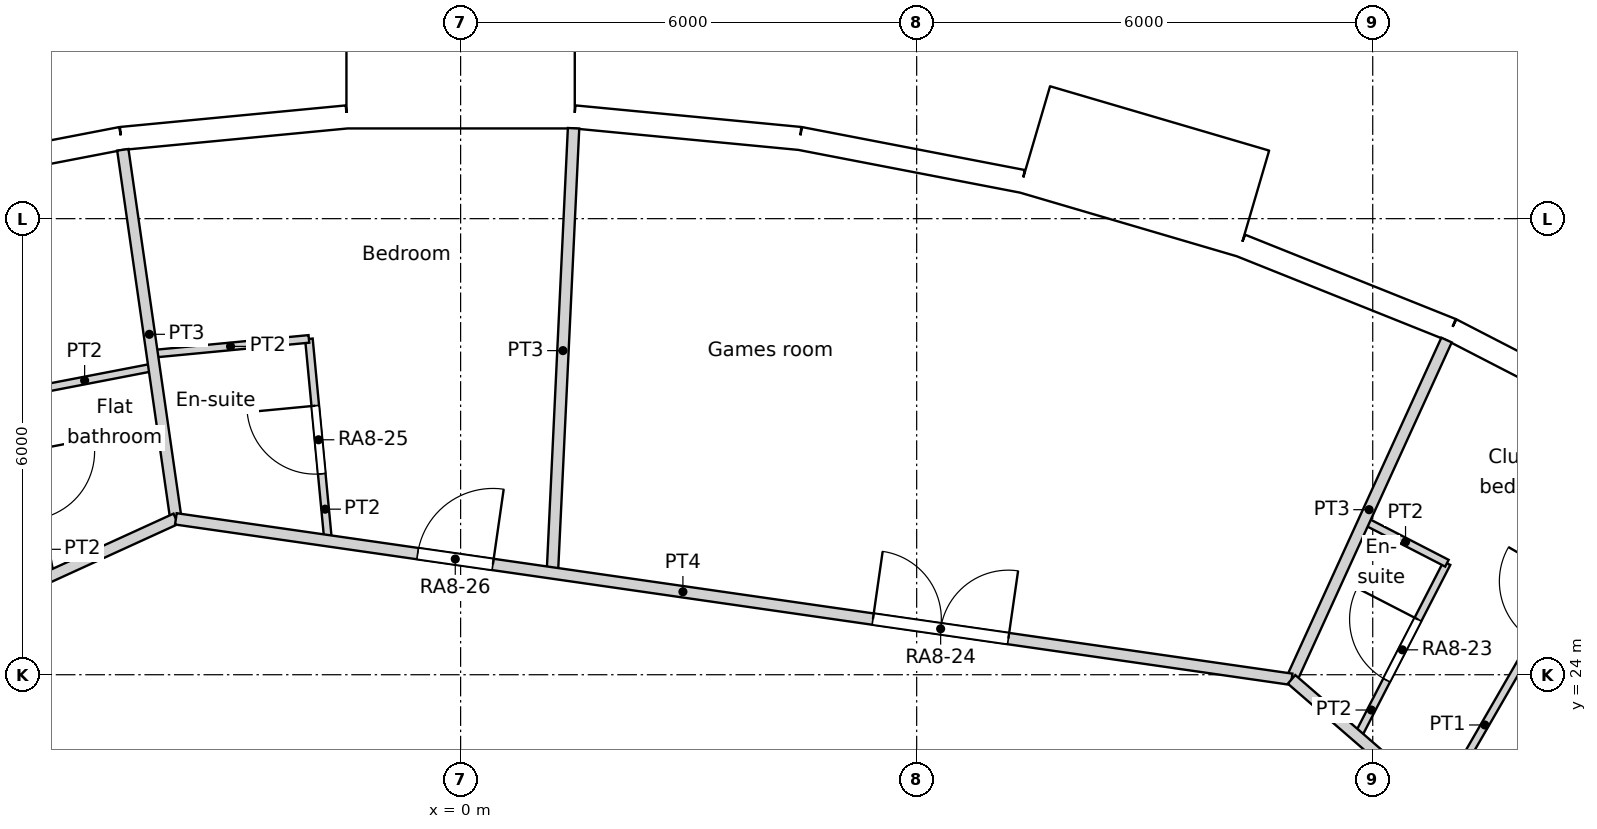
"""IFC4 building model, lengths in metres.
Left out: names, types, materials, properties, quantities, classifications, styles, units other than length and angle.
Written with IfcOpenShell. Run it as: python <this file> out.ifc"""

import sys

from ifc_helpers import new_model, si_unit, direction, frame, frame_2d, origin, origin_2d, place, context, subcontext, project, spatial, rectangle, circle, extrude, element, fill, save


model = new_model("IFC4")
c1 = context("Model", 3, precision=1e-05, world=origin(), true_north=direction((0.0, 1.0)))
c2 = subcontext(c1, "Body", "Model", "MODEL_VIEW")
j1 = project(units=[si_unit("LENGTHUNIT", "METRE"), si_unit("PLANEANGLEUNIT", "RADIAN")], contexts=[c1])
p1 = place(None, origin())
s1 = spatial("IfcSite", under=j1, at=p1, CompositionType="ELEMENT")
p2 = place(p1, origin())
s2 = spatial("IfcBuilding", under=s1, at=p2, CompositionType="ELEMENT")
p3 = place(p2, frame((0.0, 0.0, 103.8)))
s3 = spatial("IfcBuildingStorey", under=s2, at=p3, CompositionType="ELEMENT", Elevation=103.8)
for number, where, z_axis, x_axis in (
    (1, (12.576, 27.539, 0.0), (0.0, 0.0, 1.0), (1.0, 0.0, 0.0)),
    (2, (7.137, 29.421, 0.0), (0.0, 0.0, 1.0), (1.0, 0.0, 0.0)),
    (3, (1.44, 30.24, 0.0), (0.0, 0.0, 1.0), (1.0, 0.0, 0.0)),
    (4, (-4.309, 29.966, 0.0), (0.0, 0.0, 1.0), (1.0, 0.0, 0.0)),
):
    element("IfcColumn", number, at=place(p3, frame(where, z_axis=z_axis, x_axis=x_axis)), inside=s3, PredefinedType="COLUMN", context=c2, shape_type="SweptSolid", body=[
        extrude(circle(Radius=0.6, at=origin_2d()), origin(), (0.0, 0.0, 1.0), 3.6),
    ])
for number, where, z_axis, x_axis in (
    (5, (9.723, 22.54, 0.0), (0.0, 0.0, 1.0), (1.0, 0.0, 0.0)),
    (6, (4.263, 24.175, 0.0), (0.0, 0.0, 1.0), (1.0, 0.0, 0.0)),
    (7, (-1.427, 24.506, 0.0), (0.0, 0.0, 1.0), (1.0, 0.0, 0.0)),
):
    element("IfcColumn", number, at=place(p3, frame(where, z_axis=z_axis, x_axis=x_axis)), inside=s3, PredefinedType="COLUMN", context=c2, shape_type="SweptSolid", body=[
        extrude(circle(Radius=0.65, at=origin_2d()), origin(), (0.0, 0.0, 1.0), 3.6),
    ])
p4 = place(p3, frame((15.682, 27.174, 0.0), z_axis=(0.0, 0.0, 1.0), x_axis=(-0.888819853856, 0.458256770153, 0.0)))
e8 = element("IfcWall", 8, at=p4, inside=s3, PredefinedType="SOLIDWALL", context=c2, shape_type="SweptSolid", body=[
    extrude(rectangle(XDim=2.98, YDim=0.3, at=frame_2d((1.49, 0.0))), origin(), (0.0, 0.0, 1.0), 3.15),
])
p5 = place(p4, frame((1.49, 0.0, 1.55)))
e9 = element("IfcOpeningElement", 9, at=p5, cuts=e8, PredefinedType="OPENING", context=c2, shape_type="SweptSolid", body=[
    extrude(circle(Radius=0.9, at=origin_2d()), frame((0.0, 0.16, 0.0), z_axis=(0.0, -1.0, 0.0), x_axis=(1.0, 0.0, 0.0)), (0.0, 0.0, 1.0), 0.32),
])
p6 = place(p3, frame((13.033, 28.539, 0.0), z_axis=(0.0, 0.0, 1.0), x_axis=(-0.928403213937, 0.371574316054, 0.0)))
e10 = element("IfcWall", 10, at=p6, inside=s3, PredefinedType="SOLIDWALL", context=c2, shape_type="SweptSolid", body=[
    extrude(rectangle(XDim=2.98, YDim=0.3, at=frame_2d((1.49, 0.0))), origin(), (0.0, 0.0, 1.0), 3.15),
])
p7 = place(p6, frame((1.49, 0.0, 1.55)))
e11 = element("IfcOpeningElement", 11, at=p7, cuts=e10, PredefinedType="OPENING", context=c2, shape_type="SweptSolid", body=[
    extrude(circle(Radius=0.9, at=origin_2d()), frame((0.0, 0.16, 0.0), z_axis=(0.0, -1.0, 0.0), x_axis=(1.0, 0.0, 0.0)), (0.0, 0.0, 1.0), 0.32),
])
p8 = place(p3, frame((10.43, 30.198, -0.45), z_axis=(0.0, 0.0, 1.0), x_axis=(-0.959489813418, 0.281743319258, 0.0)))
e12 = element("IfcWall", 12, at=p8, inside=s3, PredefinedType="ELEMENTEDWALL", context=c2, shape_type="SweptSolid", body=[
    extrude(rectangle(XDim=3.0, YDim=1.45, at=frame_2d((1.5, 0.0))), origin(), (0.0, 0.0, 1.0), 3.6),
])
p9 = place(p8, frame((1.5, 0.0, 2.0)))
e13 = element("IfcOpeningElement", 13, at=p9, cuts=e12, PredefinedType="OPENING", context=c2, shape_type="SweptSolid", body=[
    extrude(circle(Radius=0.9, at=origin_2d()), frame((0.0, 0.735, 0.0), z_axis=(0.0, -1.0, 0.0), x_axis=(1.0, 0.0, 0.0)), (0.0, 0.0, 1.0), 1.47),
])
p10 = place(p3, frame((7.391, 30.491, 0.0), z_axis=(0.0, 0.0, 1.0), x_axis=(-0.981924535406, 0.189272836848, 0.0)))
e14 = element("IfcWall", 14, at=p10, inside=s3, PredefinedType="SOLIDWALL", context=c2, shape_type="SweptSolid", body=[
    extrude(rectangle(XDim=2.98, YDim=0.3, at=frame_2d((1.49, 0.0))), origin(), (0.0, 0.0, 1.0), 3.15),
])
p11 = place(p10, frame((1.49, 0.0, 1.55)))
e15 = element("IfcOpeningElement", 15, at=p11, cuts=e14, PredefinedType="OPENING", context=c2, shape_type="SweptSolid", body=[
    extrude(circle(Radius=0.9, at=origin_2d()), frame((0.0, 0.16, 0.0), z_axis=(0.0, -1.0, 0.0), x_axis=(1.0, 0.0, 0.0)), (0.0, 0.0, 1.0), 0.32),
])
p12 = place(p3, frame((4.465, 31.055, 0.0), z_axis=(0.0, 0.0, 1.0), x_axis=(-0.995473351551, 0.095041077185, 0.0)))
e16 = element("IfcWall", 16, at=p12, inside=s3, PredefinedType="SOLIDWALL", context=c2, shape_type="SweptSolid", body=[
    extrude(rectangle(XDim=2.98, YDim=0.3, at=frame_2d((1.49, 0.0))), origin(), (0.0, 0.0, 1.0), 3.15),
])
p13 = place(p12, frame((1.49, 0.0, 1.55)))
e17 = element("IfcOpeningElement", 17, at=p13, cuts=e16, PredefinedType="OPENING", context=c2, shape_type="SweptSolid", body=[
    extrude(circle(Radius=0.9, at=origin_2d()), frame((0.0, 0.16, 0.0), z_axis=(0.0, -1.0, 0.0), x_axis=(1.0, 0.0, 0.0)), (0.0, 0.0, 1.0), 0.32),
])
p14 = place(p3, frame((1.5, 31.914, -0.45), z_axis=(0.0, 0.0, 1.0), x_axis=(-1.0, 0.0, 0.0)))
e18 = element("IfcWall", 18, at=p14, inside=s3, PredefinedType="ELEMENTEDWALL", context=c2, shape_type="SweptSolid", body=[
    extrude(rectangle(XDim=3.0, YDim=1.45, at=frame_2d((1.5, 0.0))), origin(), (0.0, 0.0, 1.0), 3.6),
])
p15 = place(p14, frame((1.5, 0.0, 2.0)))
e19 = element("IfcOpeningElement", 19, at=p15, cuts=e18, PredefinedType="OPENING", context=c2, shape_type="SweptSolid", body=[
    extrude(circle(Radius=0.9, at=origin_2d()), frame((0.0, 0.735, 0.0), z_axis=(0.0, -1.0, 0.0), x_axis=(1.0, 0.0, 0.0)), (0.0, 0.0, 1.0), 1.47),
])
p16 = place(p3, frame((-1.499, 31.338, 0.0), z_axis=(0.0, 0.0, 1.0), x_axis=(-0.995473351551, -0.095041077185, 0.0)))
e20 = element("IfcWall", 20, at=p16, inside=s3, PredefinedType="SOLIDWALL", context=c2, shape_type="SweptSolid", body=[
    extrude(rectangle(XDim=2.98, YDim=0.3, at=frame_2d((1.49, 0.0))), origin(), (0.0, 0.0, 1.0), 3.15),
])
p17 = place(p16, frame((1.49, 0.0, 1.55)))
e21 = element("IfcOpeningElement", 21, at=p17, cuts=e20, PredefinedType="OPENING", context=c2, shape_type="SweptSolid", body=[
    extrude(circle(Radius=0.9, at=origin_2d()), frame((0.0, 0.16, 0.0), z_axis=(0.0, -1.0, 0.0), x_axis=(1.0, 0.0, 0.0)), (0.0, 0.0, 1.0), 0.32),
])
p18 = place(p3, frame((-4.465, 31.055, 0.0), z_axis=(0.0, 0.0, 1.0), x_axis=(-0.981924535406, -0.189272836848, 0.0)))
e22 = element("IfcWall", 22, at=p18, inside=s3, PredefinedType="SOLIDWALL", context=c2, shape_type="SweptSolid", body=[
    extrude(rectangle(XDim=2.98, YDim=0.3, at=frame_2d((1.49, 0.0))), origin(), (0.0, 0.0, 1.0), 3.15),
])
p19 = place(p18, frame((1.49, 0.0, 1.55)))
e23 = element("IfcOpeningElement", 23, at=p19, cuts=e22, PredefinedType="OPENING", context=c2, shape_type="SweptSolid", body=[
    extrude(circle(Radius=0.9, at=origin_2d()), frame((0.0, 0.16, 0.0), z_axis=(0.0, -1.0, 0.0), x_axis=(1.0, 0.0, 0.0)), (0.0, 0.0, 1.0), 0.32),
])
p20 = place(p3, frame((10.932, 23.939, 0.0), z_axis=(0.0, 0.0, 1.0), x_axis=(0.755838982892, -0.654757536757, 0.0)))
e24 = element("IfcWall", 24, at=p20, inside=s3, PredefinedType="PARTITIONING", context=c2, shape_type="SweptSolid", body=[
    extrude(rectangle(XDim=14.83, YDim=0.15, at=frame_2d((7.415, 0.0))), origin(), (0.0, 0.0, 1.0), 3.15),
])
p21 = place(p20, frame((12.796, 0.0, 0.0)))
e25 = element("IfcOpeningElement", 25, at=p21, cuts=e24, PredefinedType="OPENING", context=c2, shape_type="SweptSolid", body=[
    extrude(rectangle(XDim=1.0, YDim=2.1, at=frame_2d((0.5, 1.05))), frame((0.0, 0.075, 0.0), z_axis=(0.0, -1.0, 0.0), x_axis=(1.0, 0.0, 0.0)), (0.0, 0.0, 1.0), 0.15),
])
p22 = place(p20, frame((3.472, 0.0, 0.0)))
e26 = element("IfcOpeningElement", 26, at=p22, cuts=e24, PredefinedType="OPENING", context=c2, shape_type="SweptSolid", body=[
    extrude(rectangle(XDim=1.1, YDim=2.1, at=frame_2d((0.55, 1.05))), frame((0.0, 0.075, 0.0), z_axis=(0.0, -1.0, 0.0), x_axis=(1.0, 0.0, 0.0)), (0.0, 0.0, 1.0), 0.15),
])
p23 = place(p3, frame((-3.746, 26.051, 0.0), z_axis=(0.0, 0.0, 1.0), x_axis=(0.989821009857, -0.142317843033, 0.0)))
e27 = element("IfcWall", 27, at=p23, inside=s3, PredefinedType="PARTITIONING", context=c2, shape_type="SweptSolid", body=[
    extrude(rectangle(XDim=14.83, YDim=0.15, at=frame_2d((7.415, 0.0))), origin(), (0.0, 0.0, 1.0), 3.15),
])
p24 = place(p23, frame((9.265, 0.0, 0.0)))
e28 = element("IfcOpeningElement", 28, at=p24, cuts=e27, PredefinedType="OPENING", context=c2, shape_type="SweptSolid", body=[
    extrude(rectangle(XDim=1.8, YDim=2.1, at=frame_2d((0.9, 1.05))), frame((0.0, 0.075, 0.0), z_axis=(0.0, -1.0, 0.0), x_axis=(1.0, 0.0, 0.0)), (0.0, 0.0, 1.0), 0.15),
])
p25 = place(p23, frame((3.214, 0.0, 0.0)))
e29 = element("IfcOpeningElement", 29, at=p25, cuts=e27, PredefinedType="OPENING", context=c2, shape_type="SweptSolid", body=[
    extrude(rectangle(XDim=1.0, YDim=2.1, at=frame_2d((0.5, 1.05))), frame((0.0, 0.075, 0.0), z_axis=(0.0, -1.0, 0.0), x_axis=(1.0, 0.0, 0.0)), (0.0, 0.0, 1.0), 0.15),
])
p26 = place(p3, frame((-17.236, 19.891, 0.0), z_axis=(0.0, 0.0, 1.0), x_axis=(0.909645678785, 0.415385049163, 0.0)))
e30 = element("IfcWall", 30, at=p26, inside=s3, PredefinedType="PARTITIONING", context=c2, shape_type="SweptSolid", body=[
    extrude(rectangle(XDim=14.829, YDim=0.15, at=frame_2d((7.415, 0.0))), origin(), (0.0, 0.0, 1.0), 3.15),
])
p27 = place(p26, frame((11.569, 0.0, 0.0)))
e31 = element("IfcOpeningElement", 31, at=p27, cuts=e30, PredefinedType="OPENING", context=c2, shape_type="SweptSolid", body=[
    extrude(rectangle(XDim=1.0, YDim=2.1, at=frame_2d((0.5, 1.05))), frame((0.0, 0.075, 0.0), z_axis=(0.0, -1.0, 0.0), x_axis=(1.0, 0.0, 0.0)), (0.0, 0.0, 1.0), 0.15),
])
p28 = place(p26, frame((1.034, 0.0, 0.0)))
e32 = element("IfcOpeningElement", 32, at=p28, cuts=e30, PredefinedType="OPENING", context=c2, shape_type="SweptSolid", body=[
    extrude(rectangle(XDim=1.0, YDim=2.1, at=frame_2d((0.5, 1.05))), frame((0.0, 0.075, 0.0), z_axis=(0.0, -1.0, 0.0), x_axis=(1.0, 0.0, 0.0)), (0.0, 0.0, 1.0), 0.15),
])
p29 = place(p3, frame((12.859, 22.272, 0.0), z_axis=(0.0, 0.0, 1.0), x_axis=(0.499968073049, 0.866043836033, 0.0)))
e33 = element("IfcWall", 33, at=p29, inside=s3, PredefinedType="PARTITIONING", context=c2, shape_type="SweptSolid", body=[
    extrude(rectangle(XDim=5.507, YDim=0.1, at=frame_2d((2.753, 0.0))), origin(), (0.0, 0.0, 1.0), 3.15),
])
p30 = place(p29, frame((2.514, 0.0, 0.0)))
e34 = element("IfcOpeningElement", 34, at=p30, cuts=e33, PredefinedType="OPENING", context=c2, shape_type="SweptSolid", body=[
    extrude(rectangle(XDim=0.9, YDim=2.1, at=frame_2d((0.45, 1.05))), frame((0.0, 0.05, 0.0), z_axis=(0.0, -1.0, 0.0), x_axis=(1.0, 0.0, 0.0)), (0.0, 0.0, 1.0), 0.1),
])
p31 = place(p3, frame((11.802, 23.188, 0.0), z_axis=(0.0, 0.0, 1.0), x_axis=(0.457961150758, 0.888972206763, 0.0)))
e35 = element("IfcWall", 35, at=p31, inside=s3, PredefinedType="PARTITIONING", context=c2, shape_type="SweptSolid", body=[
    extrude(rectangle(XDim=2.564, YDim=0.1, at=frame_2d((1.282, 0.0))), origin(), (0.0, 0.0, 1.0), 3.15),
])
p32 = place(p31, frame((0.832, 0.0, 0.0)))
e36 = element("IfcOpeningElement", 36, at=p32, cuts=e35, PredefinedType="OPENING", context=c2, shape_type="SweptSolid", body=[
    extrude(rectangle(XDim=0.9, YDim=2.04, at=frame_2d((0.45, 1.02))), frame((0.0, 0.05, 0.0), z_axis=(0.0, -1.0, 0.0), x_axis=(1.0, 0.0, 0.0)), (0.0, 0.0, 1.0), 0.1),
])
p33 = place(p3, frame((11.887, 26.028, 0.0), z_axis=(0.0, 0.0, 1.0), x_axis=(0.888981931645, -0.457942272791, 0.0)))
e37 = element("IfcWall", 37, at=p33, inside=s3, PredefinedType="PARTITIONING", context=c2, shape_type="SweptSolid", body=[
    extrude(rectangle(XDim=1.225, YDim=0.1, at=frame_2d((0.613, 0.0))), origin(), (0.0, 0.0, 1.0), 3.15),
])
p34 = place(p3, frame((10.934, 23.94, 0.0), z_axis=(0.0, 0.0, 1.0), x_axis=(0.415204619086, 0.909728049633, 0.0)))
e38 = element("IfcWall", 38, at=p34, inside=s3, PredefinedType="PARTITIONING", context=c2, shape_type="SweptSolid", body=[
    extrude(rectangle(XDim=4.906, YDim=0.15, at=frame_2d((2.453, 0.0))), origin(), (0.0, 0.0, 1.0), 3.15),
])
p35 = place(p3, frame((1.207, 25.339, 0.0), z_axis=(0.0, 0.0, 1.0), x_axis=(0.047648334785, 0.998864173045, 0.0)))
e39 = element("IfcWall", 39, at=p35, inside=s3, PredefinedType="PARTITIONING", context=c2, shape_type="SweptSolid", body=[
    extrude(rectangle(XDim=5.856, YDim=0.15, at=frame_2d((2.928, 0.0))), origin(), (0.0, 0.0, 1.0), 3.15),
])
p36 = place(p3, frame((-1.996, 28.418, 0.0), z_axis=(0.0, 0.0, 1.0), x_axis=(0.094925726797, -0.995484357683, 0.0)))
e40 = element("IfcWall", 40, at=p36, inside=s3, PredefinedType="PARTITIONING", context=c2, shape_type="SweptSolid", body=[
    extrude(rectangle(XDim=2.667, YDim=0.1, at=frame_2d((1.333, 0.0))), origin(), (0.0, 0.0, 1.0), 3.15),
])
p37 = place(p36, frame((0.883, 0.0, 0.0)))
e41 = element("IfcOpeningElement", 41, at=p37, cuts=e40, PredefinedType="OPENING", context=c2, shape_type="SweptSolid", body=[
    extrude(rectangle(XDim=0.9, YDim=2.04, at=frame_2d((0.45, 1.02))), frame((0.0, 0.05, 0.0), z_axis=(0.0, -1.0, 0.0), x_axis=(1.0, 0.0, 0.0)), (0.0, 0.0, 1.0), 0.1),
])
p38 = place(p3, frame((-4.058, 28.221, 0.0), z_axis=(0.0, 0.0, 1.0), x_axis=(0.995466291052, 0.095115000814, 0.0)))
e42 = element("IfcWall", 42, at=p38, inside=s3, PredefinedType="PARTITIONING", context=c2, shape_type="SweptSolid", body=[
    extrude(rectangle(XDim=2.071, YDim=0.1, at=frame_2d((1.036, 0.0))), origin(), (0.0, 0.0, 1.0), 3.15),
])
p39 = place(p3, frame((-4.444, 30.906, 0.0), z_axis=(0.0, 0.0, 1.0), x_axis=(0.142306296561, -0.989822669956, 0.0)))
e43 = element("IfcWall", 43, at=p39, inside=s3, PredefinedType="PARTITIONING", context=c2, shape_type="SweptSolid", body=[
    extrude(rectangle(XDim=4.905, YDim=0.15, at=frame_2d((2.452, 0.0))), origin(), (0.0, 0.0, 1.0), 3.15),
])
p40 = place(p3, frame((-5.861, 27.694, 0.0), z_axis=(0.0, 0.0, 1.0), x_axis=(0.981879093558, 0.189508431565, 0.0)))
e44 = element("IfcWall", 44, at=p40, inside=s3, PredefinedType="PARTITIONING", context=c2, shape_type="SweptSolid", body=[
    extrude(rectangle(XDim=1.863, YDim=0.1, at=frame_2d((0.931, 0.0))), origin(), (0.0, 0.0, 1.0), 3.15),
])
p41 = place(p3, frame((-5.861, 27.694, 0.0), z_axis=(0.0, 0.0, 1.0), x_axis=(0.189229262293, -0.981932933704, 0.0)))
e45 = element("IfcWall", 45, at=p41, inside=s3, PredefinedType="PARTITIONING", context=c2, shape_type="SweptSolid", body=[
    extrude(rectangle(XDim=2.442, YDim=0.1, at=frame_2d((1.221, 0.0))), origin(), (0.0, 0.0, 1.0), 3.15),
])
p42 = place(p41, frame((0.771, 0.0, 0.0)))
e46 = element("IfcOpeningElement", 46, at=p42, cuts=e45, PredefinedType="OPENING", context=c2, shape_type="SweptSolid", body=[
    extrude(rectangle(XDim=0.9, YDim=2.0, at=frame_2d((0.45, 1.0))), frame((0.0, 0.05, 0.0), z_axis=(0.0, -1.0, 0.0), x_axis=(1.0, 0.0, 0.0)), (0.0, 0.0, 1.0), 0.1),
])
p43 = place(p5, origin())
e47 = element("IfcWindow", 47, at=p43, inside=s3, PartitioningType="SINGLE_PANEL", PredefinedType="WINDOW", context=c2, shape_type="SweptSolid", body=[
    extrude(circle(Radius=0.9, at=origin_2d()), frame((0.0, 0.12, 0.0), z_axis=(0.0, -1.0, 0.0), x_axis=(1.0, 0.0, 0.0)), (0.0, 0.0, 1.0), 0.1),
])
fill(e9, e47)
p44 = place(p7, origin())
e48 = element("IfcWindow", 48, at=p44, inside=s3, PartitioningType="SINGLE_PANEL", PredefinedType="WINDOW", context=c2, shape_type="SweptSolid", body=[
    extrude(circle(Radius=0.9, at=origin_2d()), frame((0.0, 0.12, 0.0), z_axis=(0.0, -1.0, 0.0), x_axis=(1.0, 0.0, 0.0)), (0.0, 0.0, 1.0), 0.1),
])
fill(e11, e48)
p45 = place(p9, origin())
e49 = element("IfcWindow", 49, at=p45, inside=s3, PartitioningType="SINGLE_PANEL", PredefinedType="WINDOW", context=c2, shape_type="SweptSolid", body=[
    extrude(circle(Radius=0.9, at=origin_2d()), frame((0.0, 0.695, 0.0), z_axis=(0.0, -1.0, 0.0), x_axis=(1.0, 0.0, 0.0)), (0.0, 0.0, 1.0), 0.1),
])
fill(e13, e49)
p46 = place(p11, origin())
e50 = element("IfcWindow", 50, at=p46, inside=s3, PartitioningType="SINGLE_PANEL", PredefinedType="WINDOW", context=c2, shape_type="SweptSolid", body=[
    extrude(circle(Radius=0.9, at=origin_2d()), frame((0.0, 0.12, 0.0), z_axis=(0.0, -1.0, 0.0), x_axis=(1.0, 0.0, 0.0)), (0.0, 0.0, 1.0), 0.1),
])
fill(e15, e50)
p47 = place(p13, origin())
e51 = element("IfcWindow", 51, at=p47, inside=s3, PartitioningType="SINGLE_PANEL", PredefinedType="WINDOW", context=c2, shape_type="SweptSolid", body=[
    extrude(circle(Radius=0.9, at=origin_2d()), frame((0.0, 0.12, 0.0), z_axis=(0.0, -1.0, 0.0), x_axis=(1.0, 0.0, 0.0)), (0.0, 0.0, 1.0), 0.1),
])
fill(e17, e51)
p48 = place(p15, origin())
e52 = element("IfcWindow", 52, at=p48, inside=s3, PartitioningType="SINGLE_PANEL", PredefinedType="WINDOW", context=c2, shape_type="SweptSolid", body=[
    extrude(circle(Radius=0.9, at=origin_2d()), frame((0.0, 0.695, 0.0), z_axis=(0.0, -1.0, 0.0), x_axis=(1.0, 0.0, 0.0)), (0.0, 0.0, 1.0), 0.1),
])
fill(e19, e52)
p49 = place(p17, origin())
e53 = element("IfcWindow", 53, at=p49, inside=s3, PartitioningType="SINGLE_PANEL", PredefinedType="WINDOW", context=c2, shape_type="SweptSolid", body=[
    extrude(circle(Radius=0.9, at=origin_2d()), frame((0.0, 0.12, 0.0), z_axis=(0.0, -1.0, 0.0), x_axis=(1.0, 0.0, 0.0)), (0.0, 0.0, 1.0), 0.1),
])
fill(e21, e53)
p50 = place(p19, origin())
e54 = element("IfcWindow", 54, at=p50, inside=s3, PartitioningType="SINGLE_PANEL", PredefinedType="WINDOW", context=c2, shape_type="SweptSolid", body=[
    extrude(circle(Radius=0.9, at=origin_2d()), frame((0.0, 0.12, 0.0), z_axis=(0.0, -1.0, 0.0), x_axis=(1.0, 0.0, 0.0)), (0.0, 0.0, 1.0), 0.1),
])
fill(e23, e54)
p51 = place(p32, origin())
e55 = element("IfcDoor", 55, at=p51, inside=s3, OperationType="SINGLE_SWING_RIGHT", PredefinedType="DOOR", context=c2, shape_type="SweptSolid", body=[
    extrude(rectangle(XDim=0.9, YDim=2.04, at=frame_2d((0.45, 1.02))), frame((0.0, 0.025, 0.0), z_axis=(0.0, -1.0, 0.0), x_axis=(1.0, 0.0, 0.0)), (0.0, 0.0, 1.0), 0.05),
])
fill(e36, e55)
p52 = place(p24, origin())
e56 = element("IfcDoor", 56, at=p52, inside=s3, OperationType="DOUBLE_DOOR_SINGLE_SWING", PredefinedType="DOOR", context=c2, shape_type="SweptSolid", body=[
    extrude(rectangle(XDim=1.8, YDim=2.1, at=frame_2d((0.9, 1.05))), frame((0.0, 0.025, 0.0), z_axis=(0.0, -1.0, 0.0), x_axis=(1.0, 0.0, 0.0)), (0.0, 0.0, 1.0), 0.05),
])
fill(e28, e56)
p53 = place(p37, origin())
e57 = element("IfcDoor", 57, at=p53, inside=s3, OperationType="SINGLE_SWING_RIGHT", PredefinedType="DOOR", context=c2, shape_type="SweptSolid", body=[
    extrude(rectangle(XDim=0.9, YDim=2.04, at=frame_2d((0.45, 1.02))), frame((0.0, 0.025, 0.0), z_axis=(0.0, -1.0, 0.0), x_axis=(1.0, 0.0, 0.0)), (0.0, 0.0, 1.0), 0.05),
])
fill(e41, e57)
p54 = place(p25, origin())
e58 = element("IfcDoor", 58, at=p54, inside=s3, OperationType="SINGLE_SWING_RIGHT", PredefinedType="DOOR", context=c2, shape_type="SweptSolid", body=[
    extrude(rectangle(XDim=1.0, YDim=2.1, at=frame_2d((0.5, 1.05))), frame((0.0, 0.025, 0.0), z_axis=(0.0, -1.0, 0.0), x_axis=(1.0, 0.0, 0.0)), (0.0, 0.0, 1.0), 0.05),
])
fill(e29, e58)
save(model, sys.argv[1])
